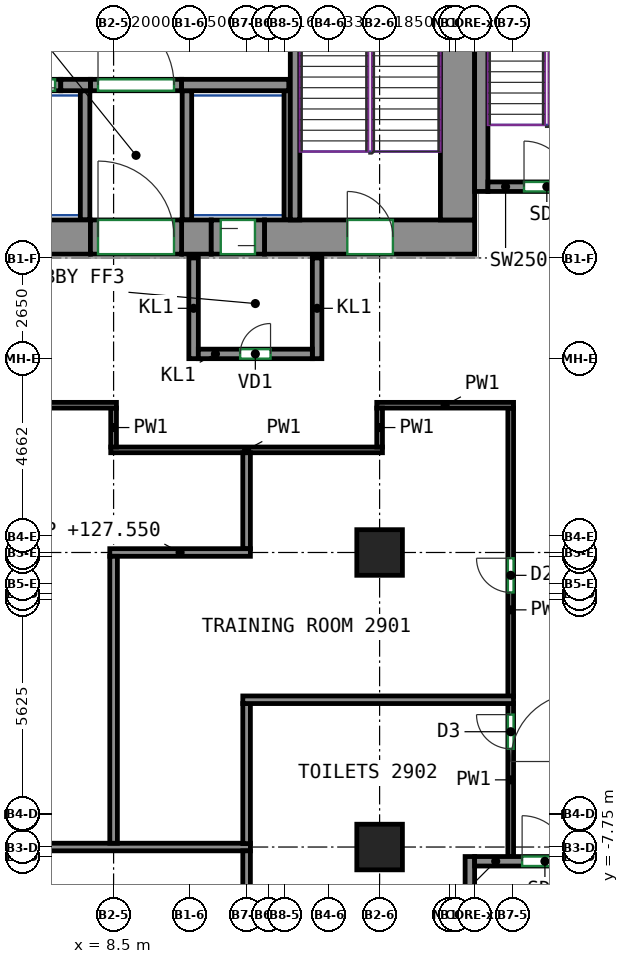
"""IFC4 building model, lengths in metres.
Left out: names, types, materials, properties, quantities, classifications, styles, units other than length and angle.
Written with IfcOpenShell. Run it as: python <this file> out.ifc"""

import sys

from ifc_helpers import new_model, si_unit, direction, frame, frame_2d, origin, origin_2d, place, context, subcontext, project, spatial, rectangle, extrude, source, transform, mapped, element, fill, save


model = new_model("IFC4")
c1 = context("Model", 3, precision=1e-05, world=origin(), true_north=direction((0.0, 1.0)))
c2 = subcontext(c1, "Body", "Model", "MODEL_VIEW")
j1 = project(units=[si_unit("LENGTHUNIT", "METRE"), si_unit("PLANEANGLEUNIT", "RADIAN")], contexts=[c1])
p1 = place(None, origin())
s1 = spatial("IfcSite", under=j1, at=p1, CompositionType="ELEMENT")
p2 = place(p1, origin())
s2 = spatial("IfcBuilding", under=s1, at=p2, CompositionType="ELEMENT")
p3 = place(p2, frame((0.0, 0.0, 124.6)))
s3 = spatial("IfcBuildingStorey", under=s2, at=p3, CompositionType="ELEMENT", Elevation=124.6)
m1 = source(origin(), c2, "Body", "SweptSolid", [
    extrude(rectangle(XDim=1.2, YDim=1.2, at=origin_2d()), origin(), (0.0, 0.0, 1.0), 3.6),
])
for number, where, z_axis, x_axis in (
    (1, (15.5, -7.5, 0.0), (0.0, 0.0, 1.0), (1.0, 0.0, 0.0)),
    (2, (15.5, 0.25, 0.0), (0.0, 0.0, 1.0), (1.0, 0.0, 0.0)),
):
    element("IfcColumn", number, at=place(p3, frame(where, z_axis=z_axis, x_axis=x_axis)), inside=s3, PredefinedType="COLUMN", context=c2, shape_type="MappedRepresentation", body=[
        mapped(m1, transform((0.0, 0.0, 0.0))),
    ])
m2 = source(origin(), c2, "Body", "SweptSolid", [
    extrude(rectangle(XDim=14.18, YDim=0.9, at=frame_2d((7.09, 0.0))), origin(), (0.0, 0.0, 1.0), 3.6),
])
p4 = place(p3, frame((-6.29, 8.55, 0.0), z_axis=(0.0, 0.0, 1.0), x_axis=(1.0, 0.0, 0.0)))
e3 = element("IfcWall", 3, at=p4, inside=s3, PredefinedType="SHEAR", context=c2, shape_type="MappedRepresentation", body=[
    mapped(m2, transform((0.0, 0.0, 0.0))),
])
m3 = source(origin(), c2, "Body", "SweptSolid", [
    extrude(rectangle(XDim=0.78, YDim=0.9, at=frame_2d((0.39, 0.0))), origin(), (0.0, 0.0, 1.0), 3.6),
])
p5 = place(p3, frame((10.29, 8.55, 0.0), z_axis=(0.0, 0.0, 1.0), x_axis=(1.0, 0.0, 0.0)))
e4 = element("IfcWall", 4, at=p5, inside=s3, PredefinedType="SHEAR", context=c2, shape_type="MappedRepresentation", body=[
    mapped(m3, transform((0.0, 0.0, 0.0))),
])
m4 = source(origin(), c2, "Body", "SweptSolid", [
    extrude(rectangle(XDim=5.53, YDim=0.9, at=frame_2d((2.765, 0.0))), origin(), (0.0, 0.0, 1.0), 3.6),
])
p6 = place(p3, frame((12.47, 8.55, 0.0), z_axis=(0.0, 0.0, 1.0), x_axis=(1.0, 0.0, 0.0)))
e5 = element("IfcWall", 5, at=p6, inside=s3, PredefinedType="SHEAR", context=c2, shape_type="MappedRepresentation", body=[
    mapped(m4, transform((0.0, 0.0, 0.0))),
])
p7 = place(p6, frame((2.18, 0.0, 0.0)))
e6 = element("IfcOpeningElement", 6, at=p7, cuts=e5, PredefinedType="OPENING", context=c2, shape_type="SweptSolid", body=[
    extrude(rectangle(XDim=1.2, YDim=2.1, at=frame_2d((0.6, 1.05))), frame((0.0, 0.46, 0.0), z_axis=(0.0, -1.0, 0.0), x_axis=(1.0, 0.0, 0.0)), (0.0, 0.0, 1.0), 0.92),
])
m5 = source(origin(), c2, "Body", "SweptSolid", [
    extrude(rectangle(XDim=12.0, YDim=0.9, at=frame_2d((6.0, 0.0))), origin(), (0.0, 0.0, 1.0), 3.6),
])
p8 = place(p3, frame((17.55, 9.0, 0.0), z_axis=(0.0, 0.0, 1.0), x_axis=(0.0, 1.0, 0.0)))
e7 = element("IfcWall", 7, at=p8, inside=s3, PredefinedType="SHEAR", context=c2, shape_type="MappedRepresentation", body=[
    mapped(m5, transform((0.0, 0.0, 0.0))),
])
m6 = source(origin(), c2, "Body", "SweptSolid", [
    extrude(rectangle(XDim=7.75, YDim=0.25, at=frame_2d((3.875, 0.0))), origin(), (0.0, 0.0, 1.0), 3.6),
])
p9 = place(p3, frame((13.275, 9.0, 0.0), z_axis=(0.0, 0.0, 1.0), x_axis=(0.0, 1.0, 0.0)))
e8 = element("IfcWall", 8, at=p9, inside=s3, PredefinedType="SHEAR", context=c2, shape_type="MappedRepresentation", body=[
    mapped(m6, transform((0.0, 0.0, 0.0))),
])
m7 = source(origin(), c2, "Body", "SweptSolid", [
    extrude(rectangle(XDim=8.0, YDim=0.25, at=frame_2d((4.0, 0.0))), origin(), (0.0, 0.0, 1.0), 3.6),
])
p10 = place(p3, frame((17.875, -15.75, 0.0), z_axis=(0.0, 0.0, 1.0), x_axis=(0.0, 1.0, 0.0)))
e9 = element("IfcWall", 9, at=p10, inside=s3, PredefinedType="SHEAR", context=c2, shape_type="MappedRepresentation", body=[
    mapped(m7, transform((0.0, 0.0, 0.0))),
])
m8 = source(origin(), c2, "Body", "SweptSolid", [
    extrude(rectangle(XDim=3.7, YDim=0.25, at=frame_2d((1.85, 0.0))), origin(), (0.0, 0.0, 1.0), 3.6),
])
p11 = place(p3, frame((18.0, -7.875, 0.0), z_axis=(0.0, 0.0, 1.0), x_axis=(1.0, 0.0, 0.0)))
e10 = element("IfcWall", 10, at=p11, inside=s3, PredefinedType="SHEAR", context=c2, shape_type="MappedRepresentation", body=[
    mapped(m8, transform((0.0, 0.0, 0.0))),
])
p12 = place(p11, frame((1.25, 0.0, 0.0)))
e11 = element("IfcOpeningElement", 11, at=p12, cuts=e10, PredefinedType="OPENING", context=c2, shape_type="SweptSolid", body=[
    extrude(rectangle(XDim=1.2, YDim=2.1, at=frame_2d((0.6, 1.05))), frame((0.0, 0.135, 0.0), z_axis=(0.0, -1.0, 0.0), x_axis=(1.0, 0.0, 0.0)), (0.0, 0.0, 1.0), 0.27),
])
m9 = source(origin(), c2, "Body", "SweptSolid", [
    extrude(rectangle(XDim=8.0, YDim=0.35, at=frame_2d((4.0, 0.0))), origin(), (0.0, 0.0, 1.0), 3.6),
])
p13 = place(p3, frame((18.175, 9.75, 0.0), z_axis=(0.0, 0.0, 1.0), x_axis=(0.0, 1.0, 0.0)))
e12 = element("IfcWall", 12, at=p13, inside=s3, PredefinedType="SHEAR", context=c2, shape_type="MappedRepresentation", body=[
    mapped(m9, transform((0.0, 0.0, 0.0))),
])
m10 = source(origin(), c2, "Body", "SweptSolid", [
    extrude(rectangle(XDim=3.1, YDim=0.25, at=frame_2d((1.55, 0.0))), origin(), (0.0, 0.0, 1.0), 3.6),
])
p14 = place(p3, frame((18.35, 9.875, 0.0), z_axis=(0.0, 0.0, 1.0), x_axis=(1.0, 0.0, 0.0)))
e13 = element("IfcWall", 13, at=p14, inside=s3, PredefinedType="SHEAR", context=c2, shape_type="MappedRepresentation", body=[
    mapped(m10, transform((0.0, 0.0, 0.0))),
])
p15 = place(p14, frame((0.95, 0.0, 0.0)))
e14 = element("IfcOpeningElement", 14, at=p15, cuts=e13, PredefinedType="OPENING", context=c2, shape_type="SweptSolid", body=[
    extrude(rectangle(XDim=1.2, YDim=2.1, at=frame_2d((0.6, 1.05))), frame((0.0, 0.135, 0.0), z_axis=(0.0, -1.0, 0.0), x_axis=(1.0, 0.0, 0.0)), (0.0, 0.0, 1.0), 0.27),
])
m11 = source(origin(), c2, "Body", "SweptSolid", [
    extrude(rectangle(XDim=0.78, YDim=0.3, at=frame_2d((0.39, 0.0))), origin(), (0.0, 0.0, 1.0), 3.6),
])
p16 = place(p3, frame((7.11, 12.55, 0.0), z_axis=(0.0, 0.0, 1.0), x_axis=(1.0, 0.0, 0.0)))
e15 = element("IfcWall", 15, at=p16, inside=s3, PredefinedType="SHEAR", context=c2, shape_type="MappedRepresentation", body=[
    mapped(m11, transform((0.0, 0.0, 0.0))),
])
m12 = source(origin(), c2, "Body", "SweptSolid", [
    extrude(rectangle(XDim=2.82, YDim=0.3, at=frame_2d((1.41, 0.0))), origin(), (0.0, 0.0, 1.0), 3.6),
])
p17 = place(p3, frame((10.29, 12.55, 0.0), z_axis=(0.0, 0.0, 1.0), x_axis=(1.0, 0.0, 0.0)))
e16 = element("IfcWall", 16, at=p17, inside=s3, PredefinedType="SHEAR", context=c2, shape_type="MappedRepresentation", body=[
    mapped(m12, transform((0.0, 0.0, 0.0))),
])
m13 = source(origin(), c2, "Body", "SweptSolid", [
    extrude(rectangle(XDim=1.4, YDim=0.3, at=frame_2d((0.7, 0.0))), origin(), (0.0, 0.0, 1.0), 3.6),
])
p18 = place(p3, frame((5.71, 12.55, 0.0), z_axis=(0.0, 0.0, 1.0), x_axis=(1.0, 0.0, 0.0)))
e17 = element("IfcWall", 17, at=p18, inside=s3, PredefinedType="PARTITIONING", context=c2, shape_type="MappedRepresentation", body=[
    mapped(m13, transform((0.0, 0.0, 0.0))),
])
p19 = place(p18, frame((0.15, 0.0, 0.0)))
e18 = element("IfcOpeningElement", 18, at=p19, cuts=e17, PredefinedType="OPENING", context=c2, shape_type="SweptSolid", body=[
    extrude(rectangle(XDim=1.1, YDim=2.1, at=frame_2d((0.55, 1.05))), frame((0.0, 0.16, 0.0), z_axis=(0.0, -1.0, 0.0), x_axis=(1.0, 0.0, 0.0)), (0.0, 0.0, 1.0), 0.32),
])
m14 = source(origin(), c2, "Body", "SweptSolid", [
    extrude(rectangle(XDim=2.4, YDim=0.3, at=frame_2d((1.2, 0.0))), origin(), (0.0, 0.0, 1.0), 3.6),
])
p20 = place(p3, frame((7.89, 12.55, 0.0), z_axis=(0.0, 0.0, 1.0), x_axis=(1.0, 0.0, 0.0)))
e19 = element("IfcWall", 19, at=p20, inside=s3, PredefinedType="PARTITIONING", context=c2, shape_type="MappedRepresentation", body=[
    mapped(m14, transform((0.0, 0.0, 0.0))),
])
p21 = place(p20, frame((0.2, 0.0, 0.0)))
e20 = element("IfcOpeningElement", 20, at=p21, cuts=e19, PredefinedType="OPENING", context=c2, shape_type="SweptSolid", body=[
    extrude(rectangle(XDim=2.0, YDim=2.1, at=frame_2d((1.0, 1.05))), frame((0.0, 0.16, 0.0), z_axis=(0.0, -1.0, 0.0), x_axis=(1.0, 0.0, 0.0)), (0.0, 0.0, 1.0), 0.32),
])
m15 = source(origin(), c2, "Body", "SweptSolid", [
    extrude(rectangle(XDim=2.65, YDim=0.25, at=frame_2d((1.325, 0.0))), origin(), (0.0, 0.0, 1.0), 3.6),
])
for number, where, z_axis, x_axis in (
    (21, (10.605, 5.35, 0.0), (0.0, 0.0, 1.0), (0.0, 1.0, 0.0)),
    (22, (13.855, 5.35, 0.0), (0.0, 0.0, 1.0), (0.0, 1.0, 0.0)),
):
    element("IfcWall", number, at=place(p3, frame(where, z_axis=z_axis, x_axis=x_axis)), inside=s3, PredefinedType="PARTITIONING", context=c2, shape_type="MappedRepresentation", body=[
        mapped(m15, transform((0.0, 0.0, 0.0))),
    ])
m16 = source(origin(), c2, "Body", "SweptSolid", [
    extrude(rectangle(XDim=3.0, YDim=0.25, at=frame_2d((1.5, 0.0))), origin(), (0.0, 0.0, 1.0), 3.6),
])
p22 = place(p3, frame((10.73, 5.475, 0.0), z_axis=(0.0, 0.0, 1.0), x_axis=(1.0, 0.0, 0.0)))
e23 = element("IfcWall", 23, at=p22, inside=s3, PredefinedType="PARTITIONING", context=c2, shape_type="MappedRepresentation", body=[
    mapped(m16, transform((0.0, 0.0, 0.0))),
])
p23 = place(p22, frame((1.1, 0.0, 0.0)))
e24 = element("IfcOpeningElement", 24, at=p23, cuts=e23, PredefinedType="OPENING", context=c2, shape_type="SweptSolid", body=[
    extrude(rectangle(XDim=0.8, YDim=2.0, at=frame_2d((0.4, 1.0))), frame((0.0, 0.135, 0.0), z_axis=(0.0, -1.0, 0.0), x_axis=(1.0, 0.0, 0.0)), (0.0, 0.0, 1.0), 0.27),
])
m17 = source(origin(), c2, "Body", "SweptSolid", [
    extrude(rectangle(XDim=3.4, YDim=0.25, at=frame_2d((1.7, 0.0))), origin(), (0.0, 0.0, 1.0), 3.6),
])
p24 = place(p3, frame((10.43, 9.0, 0.0), z_axis=(0.0, 0.0, 1.0), x_axis=(0.0, 1.0, 0.0)))
e25 = element("IfcWall", 25, at=p24, inside=s3, PredefinedType="PARTITIONING", context=c2, shape_type="MappedRepresentation", body=[
    mapped(m17, transform((0.0, 0.0, 0.0))),
])
m18 = source(origin(), c2, "Body", "SweptSolid", [
    extrude(rectangle(XDim=3.4, YDim=0.165, at=frame_2d((1.7, 0.0))), origin(), (0.0, 0.0, 1.0), 3.6),
])
p25 = place(p3, frame((13.067, 9.0, 0.0), z_axis=(0.0, 0.0, 1.0), x_axis=(0.0, 1.0, 0.0)))
e26 = element("IfcWall", 26, at=p25, inside=s3, PredefinedType="PARTITIONING", context=c2, shape_type="MappedRepresentation", body=[
    mapped(m18, transform((0.0, 0.0, 0.0))),
])
p26 = place(p3, frame((7.75, 9.0, 0.0), z_axis=(0.0, 0.0, 1.0), x_axis=(0.0, 1.0, 0.0)))
e27 = element("IfcWall", 27, at=p26, inside=s3, PredefinedType="PARTITIONING", context=c2, shape_type="MappedRepresentation", body=[
    mapped(m17, transform((0.0, 0.0, 0.0))),
])
m19 = source(origin(), c2, "Body", "SweptSolid", [
    extrude(rectangle(XDim=2.4, YDim=0.9, at=frame_2d((1.2, 0.0))), origin(), (0.0, 0.0, 1.0), 2.7),
])
p27 = place(p3, frame((7.89, 8.55, 0.0), z_axis=(0.0, 0.0, 1.0), x_axis=(1.0, 0.0, 0.0)))
e28 = element("IfcWall", 28, at=p27, inside=s3, PredefinedType="PARTITIONING", context=c2, shape_type="MappedRepresentation", body=[
    mapped(m19, transform((0.0, 0.0, 0.0))),
])
p28 = place(p27, frame((0.2, 0.0, 0.0)))
e29 = element("IfcOpeningElement", 29, at=p28, cuts=e28, PredefinedType="OPENING", context=c2, shape_type="SweptSolid", body=[
    extrude(rectangle(XDim=2.0, YDim=2.1, at=frame_2d((1.0, 1.05))), frame((0.0, 0.46, 0.0), z_axis=(0.0, -1.0, 0.0), x_axis=(1.0, 0.0, 0.0)), (0.0, 0.0, 1.0), 0.92),
])
m20 = source(origin(), c2, "Body", "SweptSolid", [
    extrude(rectangle(XDim=1.4, YDim=0.9, at=frame_2d((0.7, 0.0))), origin(), (0.0, 0.0, 1.0), 2.7),
])
p29 = place(p3, frame((11.07, 8.55, 0.0), z_axis=(0.0, 0.0, 1.0), x_axis=(1.0, 0.0, 0.0)))
e30 = element("IfcWall", 30, at=p29, inside=s3, PredefinedType="PARTITIONING", context=c2, shape_type="MappedRepresentation", body=[
    mapped(m20, transform((0.0, 0.0, 0.0))),
])
p30 = place(p29, frame((0.25, 0.0, 0.0)))
e31 = element("IfcOpeningElement", 31, at=p30, cuts=e30, PredefinedType="OPENING", context=c2, shape_type="SweptSolid", body=[
    extrude(rectangle(XDim=0.9, YDim=2.1, at=frame_2d((0.45, 1.05))), frame((0.0, 0.46, 0.0), z_axis=(0.0, -1.0, 0.0), x_axis=(1.0, 0.0, 0.0)), (0.0, 0.0, 1.0), 0.92),
])
p31 = place(p3, frame((8.425, 2.95, 0.0), z_axis=(0.0, 0.0, 1.0), x_axis=(1.0, 0.0, 0.0)))
e32 = element("IfcWall", 32, at=p31, inside=s3, PredefinedType="PARTITIONING", context=c2, shape_type="SweptSolid", body=[
    extrude(rectangle(XDim=7.15, YDim=0.15, at=frame_2d((3.575, 0.0))), origin(), (0.0, 0.0, 1.0), 3.6),
])
p32 = place(p3, frame((8.5, 4.05, 0.0), z_axis=(0.0, 0.0, 1.0), x_axis=(0.0, -1.0, 0.0)))
e33 = element("IfcWall", 33, at=p32, inside=s3, PredefinedType="PARTITIONING", context=c2, shape_type="SweptSolid", body=[
    extrude(rectangle(XDim=1.025, YDim=0.15, at=frame_2d((0.513, 0.0))), origin(), (0.0, 0.0, 1.0), 3.6),
])
p33 = place(p3, frame((-2.075, 4.125, 0.0), z_axis=(0.0, 0.0, 1.0), x_axis=(1.0, 0.0, 0.0)))
e34 = element("IfcWall", 34, at=p33, inside=s3, PredefinedType="PARTITIONING", context=c2, shape_type="SweptSolid", body=[
    extrude(rectangle(XDim=10.65, YDim=0.15, at=frame_2d((5.325, 0.0))), origin(), (0.0, 0.0, 1.0), 3.6),
])
p34 = place(p33, frame((5.227, 0.0, 0.0)))
e35 = element("IfcOpeningElement", 35, at=p34, cuts=e34, PredefinedType="OPENING", context=c2, shape_type="SweptSolid", body=[
    extrude(rectangle(XDim=0.9, YDim=2.1, at=frame_2d((0.45, 1.05))), frame((0.0, 0.085, 0.0), z_axis=(0.0, -1.0, 0.0), x_axis=(1.0, 0.0, 0.0)), (0.0, 0.0, 1.0), 0.17),
])
p35 = place(p3, frame((18.95, -7.75, 0.0), z_axis=(0.0, 0.0, 1.0), x_axis=(0.0, 1.0, 0.0)))
e36 = element("IfcWall", 36, at=p35, inside=s3, PredefinedType="PARTITIONING", context=c2, shape_type="SweptSolid", body=[
    extrude(rectangle(XDim=4.035, YDim=0.15, at=frame_2d((2.018, 0.0))), origin(), (0.0, 0.0, 1.0), 3.6),
])
p36 = place(p35, frame((2.834, 0.0, 0.0)))
e37 = element("IfcOpeningElement", 37, at=p36, cuts=e36, PredefinedType="OPENING", context=c2, shape_type="SweptSolid", body=[
    extrude(rectangle(XDim=0.9, YDim=2.1, at=frame_2d((0.45, 1.05))), frame((0.0, 0.085, 0.0), z_axis=(0.0, -1.0, 0.0), x_axis=(1.0, 0.0, 0.0)), (0.0, 0.0, 1.0), 0.17),
])
p37 = place(p3, frame((18.95, -3.535, 0.0), z_axis=(0.0, 0.0, 1.0), x_axis=(0.0, 1.0, 0.0)))
e38 = element("IfcWall", 38, at=p37, inside=s3, PredefinedType="PARTITIONING", context=c2, shape_type="SweptSolid", body=[
    extrude(rectangle(XDim=7.585, YDim=0.15, at=frame_2d((3.792, 0.0))), origin(), (0.0, 0.0, 1.0), 3.6),
])
p38 = place(p37, frame((2.734, 0.0, 0.0)))
e39 = element("IfcOpeningElement", 39, at=p38, cuts=e38, PredefinedType="OPENING", context=c2, shape_type="SweptSolid", body=[
    extrude(rectangle(XDim=0.9, YDim=2.1, at=frame_2d((0.45, 1.05))), frame((0.0, 0.085, 0.0), z_axis=(0.0, -1.0, 0.0), x_axis=(1.0, 0.0, 0.0)), (0.0, 0.0, 1.0), 0.17),
])
p39 = place(p3, frame((15.425, 4.125, 0.0), z_axis=(0.0, 0.0, 1.0), x_axis=(1.0, 0.0, 0.0)))
e40 = element("IfcWall", 40, at=p39, inside=s3, PredefinedType="PARTITIONING", context=c2, shape_type="SweptSolid", body=[
    extrude(rectangle(XDim=3.6, YDim=0.15, at=frame_2d((1.8, 0.0))), origin(), (0.0, 0.0, 1.0), 3.6),
])
p40 = place(p3, frame((15.5, 3.025, 0.0), z_axis=(0.0, 0.0, 1.0), x_axis=(0.0, 1.0, 0.0)))
e41 = element("IfcWall", 41, at=p40, inside=s3, PredefinedType="PARTITIONING", context=c2, shape_type="SweptSolid", body=[
    extrude(rectangle(XDim=1.025, YDim=0.15, at=frame_2d((0.513, 0.0))), origin(), (0.0, 0.0, 1.0), 3.6),
])
p41 = place(p3, frame((1.4, -7.5, 0.0), z_axis=(0.0, 0.0, 1.0), x_axis=(1.0, 0.0, 0.0)))
e42 = element("IfcWall", 42, at=p41, inside=s3, PredefinedType="PARTITIONING", context=c2, shape_type="SweptSolid", body=[
    extrude(rectangle(XDim=10.7, YDim=0.2, at=frame_2d((5.35, 0.0))), origin(), (0.0, 0.0, 1.0), 2.95),
])
p42 = place(p3, frame((12.0, -11.275, 0.0), z_axis=(0.0, 0.0, 1.0), x_axis=(0.0, 1.0, 0.0)))
e43 = element("IfcWall", 43, at=p42, inside=s3, PredefinedType="PARTITIONING", context=c2, shape_type="SweptSolid", body=[
    extrude(rectangle(XDim=3.675, YDim=0.2, at=frame_2d((1.837, 0.0))), origin(), (0.0, 0.0, 1.0), 3.6),
])
p43 = place(p3, frame((12.0, 0.35, 0.0), z_axis=(0.0, 0.0, 1.0), x_axis=(0.0, 1.0, 0.0)))
e44 = element("IfcWall", 44, at=p43, inside=s3, PredefinedType="PARTITIONING", context=c2, shape_type="SweptSolid", body=[
    extrude(rectangle(XDim=2.524, YDim=0.2, at=frame_2d((1.262, 0.0))), origin(), (0.0, 0.0, 1.0), 3.6),
])
p44 = place(p3, frame((8.4, 0.25, 0.0), z_axis=(0.0, 0.0, 1.0), x_axis=(1.0, 0.0, 0.0)))
e45 = element("IfcWall", 45, at=p44, inside=s3, PredefinedType="PARTITIONING", context=c2, shape_type="SweptSolid", body=[
    extrude(rectangle(XDim=3.7, YDim=0.2, at=frame_2d((1.85, 0.0))), origin(), (0.0, 0.0, 1.0), 2.95),
])
p45 = place(p3, frame((8.5, -7.4, 0.0), z_axis=(0.0, 0.0, 1.0), x_axis=(0.0, 1.0, 0.0)))
e46 = element("IfcWall", 46, at=p45, inside=s3, PredefinedType="PARTITIONING", context=c2, shape_type="SweptSolid", body=[
    extrude(rectangle(XDim=7.55, YDim=0.2, at=frame_2d((3.775, 0.0))), origin(), (0.0, 0.0, 1.0), 3.6),
])
p46 = place(p3, frame((12.0, -7.41, 0.0), z_axis=(0.0, 0.0, 1.0), x_axis=(0.0, 1.0, 0.0)))
e47 = element("IfcWall", 47, at=p46, inside=s3, PredefinedType="PARTITIONING", context=c2, shape_type="SweptSolid", body=[
    extrude(rectangle(XDim=3.685, YDim=0.2, at=frame_2d((1.842, 0.0))), origin(), (0.0, 0.0, 1.0), 3.6),
])
p47 = place(p3, frame((11.9, -3.625, 0.0), z_axis=(0.0, 0.0, 1.0), x_axis=(1.0, 0.0, 0.0)))
e48 = element("IfcWall", 48, at=p47, inside=s3, PredefinedType="PARTITIONING", context=c2, shape_type="SweptSolid", body=[
    extrude(rectangle(XDim=7.124, YDim=0.2, at=frame_2d((3.562, 0.0))), origin(), (0.0, 0.0, 1.0), 3.6),
])
p48 = place(p21, origin())
e49 = element("IfcDoor", 49, at=p48, inside=s3, OperationType="DOUBLE_DOOR_SINGLE_SWING", PredefinedType="DOOR", context=c2, shape_type="SweptSolid", body=[
    extrude(rectangle(XDim=2.0, YDim=2.1, at=frame_2d((1.0, 1.05))), frame((0.0, 0.025, 0.0), z_axis=(0.0, -1.0, 0.0), x_axis=(1.0, 0.0, 0.0)), (0.0, 0.0, 1.0), 0.05),
])
fill(e20, e49)
p49 = place(p28, origin())
e50 = element("IfcDoor", 50, at=p49, inside=s3, OperationType="DOUBLE_DOOR_SINGLE_SWING", PredefinedType="DOOR", context=c2, shape_type="SweptSolid", body=[
    extrude(rectangle(XDim=2.0, YDim=2.1, at=frame_2d((1.0, 1.05))), frame((0.0, 0.355, 0.0), z_axis=(0.0, -1.0, 0.0), x_axis=(1.0, 0.0, 0.0)), (0.0, 0.0, 1.0), 0.05),
])
fill(e29, e50)
p50 = place(p23, origin())
e51 = element("IfcDoor", 51, at=p50, inside=s3, OperationType="SINGLE_SWING_RIGHT", PredefinedType="DOOR", context=c2, shape_type="SweptSolid", body=[
    extrude(rectangle(XDim=0.8, YDim=2.0, at=frame_2d((0.4, 1.0))), frame((0.0, 0.025, 0.0), z_axis=(0.0, -1.0, 0.0), x_axis=(1.0, 0.0, 0.0)), (0.0, 0.0, 1.0), 0.05),
])
fill(e24, e51)
p51 = place(p30, origin())
e52 = element("IfcDoor", 52, at=p51, inside=s3, OperationType="SLIDING_TO_LEFT", PredefinedType="DOOR", context=c2, shape_type="SweptSolid", body=[
    extrude(rectangle(XDim=0.9, YDim=2.1, at=frame_2d((0.45, 1.05))), frame((0.0, 0.355, 0.0), z_axis=(0.0, -1.0, 0.0), x_axis=(1.0, 0.0, 0.0)), (0.0, 0.0, 1.0), 0.05),
])
fill(e31, e52)
p52 = place(p19, origin())
e53 = element("IfcDoor", 53, at=p52, inside=s3, OperationType="DOUBLE_DOOR_SLIDING", PredefinedType="DOOR", context=c2, shape_type="SweptSolid", body=[
    extrude(rectangle(XDim=1.1, YDim=2.1, at=frame_2d((0.55, 1.05))), frame((0.0, 0.025, 0.0), z_axis=(0.0, -1.0, 0.0), x_axis=(1.0, 0.0, 0.0)), (0.0, 0.0, 1.0), 0.05),
])
fill(e18, e53)
p53 = place(p7, origin())
e54 = element("IfcDoor", 54, at=p53, inside=s3, OperationType="DOUBLE_DOOR_SINGLE_SWING", PredefinedType="DOOR", context=c2, shape_type="SweptSolid", body=[
    extrude(rectangle(XDim=1.2, YDim=2.1, at=frame_2d((0.6, 1.05))), frame((0.0, 0.355, 0.0), z_axis=(0.0, -1.0, 0.0), x_axis=(1.0, 0.0, 0.0)), (0.0, 0.0, 1.0), 0.05),
])
fill(e6, e54)
p54 = place(p12, origin())
e55 = element("IfcDoor", 55, at=p54, inside=s3, OperationType="DOUBLE_DOOR_SINGLE_SWING", PredefinedType="DOOR", context=c2, shape_type="SweptSolid", body=[
    extrude(rectangle(XDim=1.2, YDim=2.1, at=frame_2d((0.6, 1.05))), frame((0.0, 0.025, 0.0), z_axis=(0.0, -1.0, 0.0), x_axis=(1.0, 0.0, 0.0)), (0.0, 0.0, 1.0), 0.05),
])
fill(e11, e55)
p55 = place(p15, origin())
e56 = element("IfcDoor", 56, at=p55, inside=s3, OperationType="DOUBLE_DOOR_SINGLE_SWING", PredefinedType="DOOR", context=c2, shape_type="SweptSolid", body=[
    extrude(rectangle(XDim=1.2, YDim=2.1, at=frame_2d((0.6, 1.05))), frame((0.0, 0.025, 0.0), z_axis=(0.0, -1.0, 0.0), x_axis=(1.0, 0.0, 0.0)), (0.0, 0.0, 1.0), 0.05),
])
fill(e14, e56)
p56 = place(p36, origin())
e57 = element("IfcDoor", 57, at=p56, inside=s3, OperationType="SINGLE_SWING_RIGHT", PredefinedType="DOOR", context=c2, shape_type="SweptSolid", body=[
    extrude(rectangle(XDim=0.9, YDim=2.1, at=frame_2d((0.45, 1.05))), frame((0.0, 0.025, 0.0), z_axis=(0.0, -1.0, 0.0), x_axis=(1.0, 0.0, 0.0)), (0.0, 0.0, 1.0), 0.05),
])
fill(e37, e57)
p57 = place(p38, origin())
e58 = element("IfcDoor", 58, at=p57, inside=s3, OperationType="SINGLE_SWING_RIGHT", PredefinedType="DOOR", context=c2, shape_type="SweptSolid", body=[
    extrude(rectangle(XDim=0.9, YDim=2.1, at=frame_2d((0.45, 1.05))), frame((0.0, 0.025, 0.0), z_axis=(0.0, -1.0, 0.0), x_axis=(1.0, 0.0, 0.0)), (0.0, 0.0, 1.0), 0.05),
])
fill(e39, e58)
save(model, sys.argv[1])
